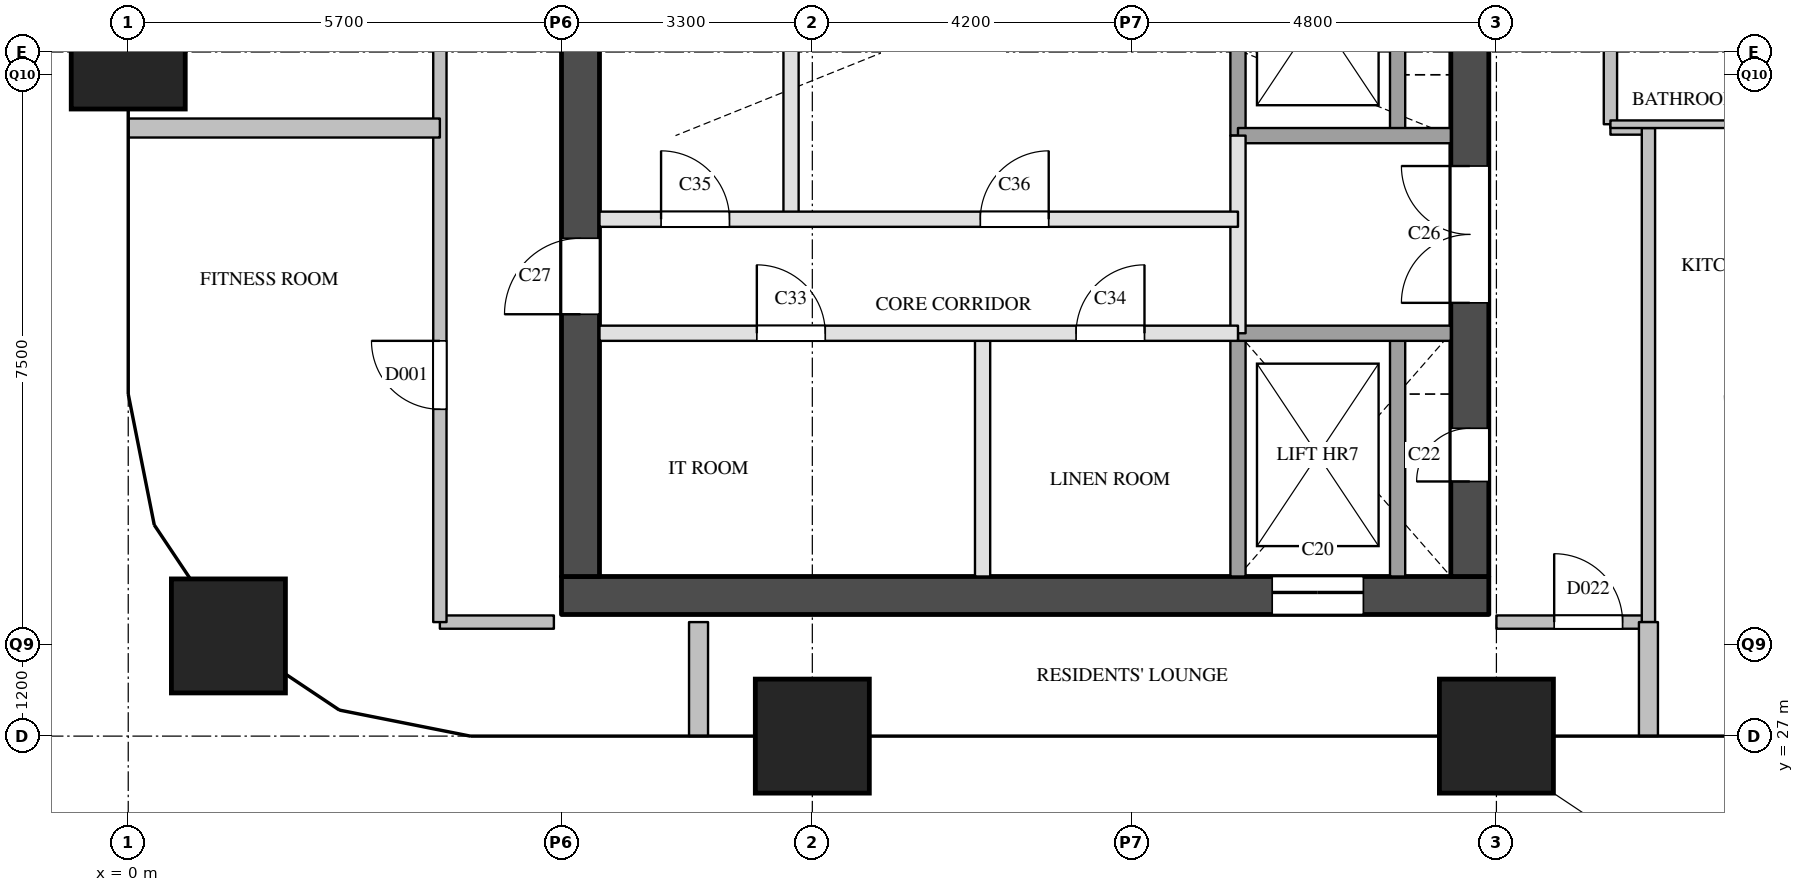
"""IFC4 building model, lengths in metres.
Left out: names, types, materials, properties, quantities, classifications, styles, units other than length and angle.
Written with IfcOpenShell. Run it as: python <this file> out.ifc"""

import sys

from ifc_helpers import new_model, si_unit, direction, frame, frame_2d, origin, origin_2d, place, context, subcontext, project, spatial, rectangle, extrude, element, fill, save


model = new_model("IFC4")
c1 = context("Model", 3, precision=1e-05, world=origin(), true_north=direction((0.0, 1.0)))
c2 = subcontext(c1, "Body", "Model", "MODEL_VIEW")
j1 = project(units=[si_unit("LENGTHUNIT", "METRE"), si_unit("PLANEANGLEUNIT", "RADIAN")], contexts=[c1])
p1 = place(None, origin())
s1 = spatial("IfcSite", under=j1, at=p1, CompositionType="ELEMENT")
p2 = place(p1, origin())
s2 = spatial("IfcBuilding", under=s1, at=p2, CompositionType="ELEMENT")
p3 = place(p2, frame((0.0, 0.0, 142.7)))
s3 = spatial("IfcBuildingStorey", under=s2, at=p3, CompositionType="ELEMENT", Elevation=142.7)
for number, where, z_axis, x_axis in (
    (1, (1.318, 28.318, 0.0), (0.0, 0.0, 1.0), (1.0, 0.0, 0.0)),
    (2, (0.0, 36.0, 0.0), (0.0, 0.0, 1.0), (1.0, 0.0, 0.0)),
    (3, (9.0, 27.0, 0.0), (0.0, 0.0, 1.0), (1.0, 0.0, 0.0)),
    (4, (18.0, 27.0, 0.0), (0.0, 0.0, 1.0), (1.0, 0.0, 0.0)),
):
    element("IfcColumn", number, at=place(p3, frame(where, z_axis=z_axis, x_axis=x_axis)), inside=s3, PredefinedType="COLUMN", context=c2, shape_type="SweptSolid", body=[
        extrude(rectangle(XDim=1.5, YDim=1.5, at=origin_2d()), origin(), (0.0, 0.0, 1.0), 3.9),
    ])
p4 = place(p3, frame((5.7, 28.85, 0.0), z_axis=(0.0, 0.0, 1.0), x_axis=(1.0, 0.0, 0.0)))
e5 = element("IfcWall", 5, at=p4, inside=s3, PredefinedType="SHEAR", context=c2, shape_type="SweptSolid", body=[
    extrude(rectangle(XDim=12.2, YDim=0.5, at=frame_2d((6.1, 0.0))), origin(), (0.0, 0.0, 1.0), 3.6),
])
p5 = place(p4, frame((9.35, 0.0, 0.0)))
e6 = element("IfcOpeningElement", 6, at=p5, cuts=e5, PredefinedType="OPENING", context=c2, shape_type="SweptSolid", body=[
    extrude(rectangle(XDim=1.2, YDim=2.1, at=frame_2d((0.6, 1.05))), frame((0.0, 0.26, 0.0), z_axis=(0.0, -1.0, 0.0), x_axis=(1.0, 0.0, 0.0)), (0.0, 0.0, 1.0), 0.52),
])
p6 = place(p3, frame((5.95, 29.1, 0.0), z_axis=(0.0, 0.0, 1.0), x_axis=(0.0, 1.0, 0.0)))
e7 = element("IfcWall", 7, at=p6, inside=s3, PredefinedType="SHEAR", context=c2, shape_type="SweptSolid", body=[
    extrude(rectangle(XDim=20.3, YDim=0.5, at=frame_2d((10.15, 0.0))), origin(), (0.0, 0.0, 1.0), 3.6),
])
p7 = place(p6, frame((3.45, 0.0, 0.0)))
e8 = element("IfcOpeningElement", 8, at=p7, cuts=e7, PredefinedType="OPENING", context=c2, shape_type="SweptSolid", body=[
    extrude(rectangle(XDim=1.0, YDim=2.1, at=frame_2d((0.5, 1.05))), frame((0.0, 0.26, 0.0), z_axis=(0.0, -1.0, 0.0), x_axis=(1.0, 0.0, 0.0)), (0.0, 0.0, 1.0), 0.52),
])
p8 = place(p6, frame((16.4, 0.0, 0.0)))
e9 = element("IfcOpeningElement", 9, at=p8, cuts=e7, PredefinedType="OPENING", context=c2, shape_type="SweptSolid", body=[
    extrude(rectangle(XDim=1.0, YDim=2.1, at=frame_2d((0.5, 1.05))), frame((0.0, 0.26, 0.0), z_axis=(0.0, -1.0, 0.0), x_axis=(1.0, 0.0, 0.0)), (0.0, 0.0, 1.0), 0.52),
])
p9 = place(p3, frame((17.65, 29.1, 0.0), z_axis=(0.0, 0.0, 1.0), x_axis=(0.0, 1.0, 0.0)))
e10 = element("IfcWall", 10, at=p9, inside=s3, PredefinedType="SHEAR", context=c2, shape_type="SweptSolid", body=[
    extrude(rectangle(XDim=20.3, YDim=0.5, at=frame_2d((10.15, 0.0))), origin(), (0.0, 0.0, 1.0), 3.6),
])
p10 = place(p9, frame((1.25, 0.0, 0.0)))
e11 = element("IfcOpeningElement", 11, at=p10, cuts=e10, PredefinedType="OPENING", context=c2, shape_type="SweptSolid", body=[
    extrude(rectangle(XDim=0.7, YDim=2.1, at=frame_2d((0.35, 1.05))), frame((0.0, 0.26, 0.0), z_axis=(0.0, -1.0, 0.0), x_axis=(1.0, 0.0, 0.0)), (0.0, 0.0, 1.0), 0.52),
])
p11 = place(p9, frame((7.05, 0.0, 0.0)))
e12 = element("IfcOpeningElement", 12, at=p11, cuts=e10, PredefinedType="OPENING", context=c2, shape_type="SweptSolid", body=[
    extrude(rectangle(XDim=0.7, YDim=2.1, at=frame_2d((0.35, 1.05))), frame((0.0, 0.26, 0.0), z_axis=(0.0, -1.0, 0.0), x_axis=(1.0, 0.0, 0.0)), (0.0, 0.0, 1.0), 0.52),
])
p12 = place(p9, frame((3.6, 0.0, 0.0)))
e13 = element("IfcOpeningElement", 13, at=p12, cuts=e10, PredefinedType="OPENING", context=c2, shape_type="SweptSolid", body=[
    extrude(rectangle(XDim=1.8, YDim=2.1, at=frame_2d((0.9, 1.05))), frame((0.0, 0.26, 0.0), z_axis=(0.0, -1.0, 0.0), x_axis=(1.0, 0.0, 0.0)), (0.0, 0.0, 1.0), 0.52),
])
p13 = place(p3, frame((8.72, 33.8, 0.0), z_axis=(0.0, 0.0, 1.0), x_axis=(0.0, 1.0, 0.0)))
e14 = element("IfcWall", 14, at=p13, inside=s3, PredefinedType="PARTITIONING", context=c2, shape_type="SweptSolid", body=[
    extrude(rectangle(XDim=4.3, YDim=0.2, at=frame_2d((2.15, 0.0))), origin(), (0.0, 0.0, 1.0), 3.6),
])
p14 = place(p3, frame((11.24, 29.1, 0.0), z_axis=(0.0, 0.0, 1.0), x_axis=(0.0, 1.0, 0.0)))
e15 = element("IfcWall", 15, at=p14, inside=s3, PredefinedType="PARTITIONING", context=c2, shape_type="SweptSolid", body=[
    extrude(rectangle(XDim=3.2, YDim=0.2, at=frame_2d((1.6, 0.0))), origin(), (0.0, 0.0, 1.0), 3.6),
])
p15 = place(p3, frame((14.6, 32.3, 0.0), z_axis=(0.0, 0.0, 1.0), x_axis=(0.0, 1.0, 0.0)))
e16 = element("IfcWall", 16, at=p15, inside=s3, PredefinedType="PARTITIONING", context=c2, shape_type="SweptSolid", body=[
    extrude(rectangle(XDim=2.6, YDim=0.2, at=frame_2d((1.3, 0.0))), origin(), (0.0, 0.0, 1.0), 3.6),
])
p16 = place(p3, frame((14.6, 29.1, 0.0), z_axis=(0.0, 0.0, 1.0), x_axis=(0.0, 1.0, 0.0)))
e17 = element("IfcWall", 17, at=p16, inside=s3, PredefinedType="SOLIDWALL", context=c2, shape_type="SweptSolid", body=[
    extrude(rectangle(XDim=3.2, YDim=0.2, at=frame_2d((1.6, 0.0))), origin(), (0.0, 0.0, 1.0), 3.6),
])
p17 = place(p3, frame((14.6, 34.9, 0.0), z_axis=(0.0, 0.0, 1.0), x_axis=(0.0, 1.0, 0.0)))
e18 = element("IfcWall", 18, at=p17, inside=s3, PredefinedType="SOLIDWALL", context=c2, shape_type="SweptSolid", body=[
    extrude(rectangle(XDim=3.2, YDim=0.2, at=frame_2d((1.6, 0.0))), origin(), (0.0, 0.0, 1.0), 3.6),
])
p18 = place(p3, frame((16.7, 29.1, 0.0), z_axis=(0.0, 0.0, 1.0), x_axis=(0.0, 1.0, 0.0)))
e19 = element("IfcWall", 19, at=p18, inside=s3, PredefinedType="SOLIDWALL", context=c2, shape_type="SweptSolid", body=[
    extrude(rectangle(XDim=3.2, YDim=0.2, at=frame_2d((1.6, 0.0))), origin(), (0.0, 0.0, 1.0), 3.6),
])
p19 = place(p3, frame((16.7, 34.9, 0.0), z_axis=(0.0, 0.0, 1.0), x_axis=(0.0, 1.0, 0.0)))
e20 = element("IfcWall", 20, at=p19, inside=s3, PredefinedType="SOLIDWALL", context=c2, shape_type="SweptSolid", body=[
    extrude(rectangle(XDim=3.2, YDim=0.2, at=frame_2d((1.6, 0.0))), origin(), (0.0, 0.0, 1.0), 3.6),
])
p20 = place(p3, frame((6.2, 32.3, 0.0), z_axis=(0.0, 0.0, 1.0), x_axis=(1.0, 0.0, 0.0)))
e21 = element("IfcWall", 21, at=p20, inside=s3, PredefinedType="PARTITIONING", context=c2, shape_type="SweptSolid", body=[
    extrude(rectangle(XDim=8.4, YDim=0.2, at=frame_2d((4.2, 0.0))), origin(), (0.0, 0.0, 1.0), 3.6),
])
p21 = place(p20, frame((2.07, 0.0, 0.0)))
e22 = element("IfcOpeningElement", 22, at=p21, cuts=e21, PredefinedType="OPENING", context=c2, shape_type="SweptSolid", body=[
    extrude(rectangle(XDim=0.9, YDim=2.1, at=frame_2d((0.45, 1.05))), frame((0.0, 0.11, 0.0), z_axis=(0.0, -1.0, 0.0), x_axis=(1.0, 0.0, 0.0)), (0.0, 0.0, 1.0), 0.22),
])
p22 = place(p20, frame((6.27, 0.0, 0.0)))
e23 = element("IfcOpeningElement", 23, at=p22, cuts=e21, PredefinedType="OPENING", context=c2, shape_type="SweptSolid", body=[
    extrude(rectangle(XDim=0.9, YDim=2.1, at=frame_2d((0.45, 1.05))), frame((0.0, 0.11, 0.0), z_axis=(0.0, -1.0, 0.0), x_axis=(1.0, 0.0, 0.0)), (0.0, 0.0, 1.0), 0.22),
])
p23 = place(p3, frame((14.6, 32.3, 0.0), z_axis=(0.0, 0.0, 1.0), x_axis=(1.0, 0.0, 0.0)))
e24 = element("IfcWall", 24, at=p23, inside=s3, PredefinedType="SOLIDWALL", context=c2, shape_type="SweptSolid", body=[
    extrude(rectangle(XDim=2.8, YDim=0.2, at=frame_2d((1.4, 0.0))), origin(), (0.0, 0.0, 1.0), 3.6),
])
p24 = place(p3, frame((6.2, 33.8, 0.0), z_axis=(0.0, 0.0, 1.0), x_axis=(1.0, 0.0, 0.0)))
e25 = element("IfcWall", 25, at=p24, inside=s3, PredefinedType="PARTITIONING", context=c2, shape_type="SweptSolid", body=[
    extrude(rectangle(XDim=8.4, YDim=0.2, at=frame_2d((4.2, 0.0))), origin(), (0.0, 0.0, 1.0), 3.6),
])
p25 = place(p24, frame((0.81, 0.0, 0.0)))
e26 = element("IfcOpeningElement", 26, at=p25, cuts=e25, PredefinedType="OPENING", context=c2, shape_type="SweptSolid", body=[
    extrude(rectangle(XDim=0.9, YDim=2.1, at=frame_2d((0.45, 1.05))), frame((0.0, 0.11, 0.0), z_axis=(0.0, -1.0, 0.0), x_axis=(1.0, 0.0, 0.0)), (0.0, 0.0, 1.0), 0.22),
])
p26 = place(p24, frame((5.01, 0.0, 0.0)))
e27 = element("IfcOpeningElement", 27, at=p26, cuts=e25, PredefinedType="OPENING", context=c2, shape_type="SweptSolid", body=[
    extrude(rectangle(XDim=0.9, YDim=2.1, at=frame_2d((0.45, 1.05))), frame((0.0, 0.11, 0.0), z_axis=(0.0, -1.0, 0.0), x_axis=(1.0, 0.0, 0.0)), (0.0, 0.0, 1.0), 0.22),
])
p27 = place(p3, frame((14.6, 34.9, 0.0), z_axis=(0.0, 0.0, 1.0), x_axis=(1.0, 0.0, 0.0)))
e28 = element("IfcWall", 28, at=p27, inside=s3, PredefinedType="SOLIDWALL", context=c2, shape_type="SweptSolid", body=[
    extrude(rectangle(XDim=2.8, YDim=0.2, at=frame_2d((1.4, 0.0))), origin(), (0.0, 0.0, 1.0), 3.6),
])
p28 = place(p3, frame((4.1, 28.5, 0.0), z_axis=(0.0, 0.0, 1.0), x_axis=(1.0, 0.0, 0.0)))
e29 = element("IfcWall", 29, at=p28, inside=s3, PredefinedType="PARTITIONING", context=c2, shape_type="SweptSolid", body=[
    extrude(rectangle(XDim=1.5, YDim=0.175, at=frame_2d((0.75, 0.0))), origin(), (0.0, 0.0, 1.0), 3.6),
])
p29 = place(p3, frame((18.0, 28.5, 0.0), z_axis=(0.0, 0.0, 1.0), x_axis=(1.0, 0.0, 0.0)))
e30 = element("IfcWall", 30, at=p29, inside=s3, PredefinedType="PARTITIONING", context=c2, shape_type="SweptSolid", body=[
    extrude(rectangle(XDim=2.0, YDim=0.175, at=frame_2d((1.0, 0.0))), origin(), (0.0, 0.0, 1.0), 3.6),
])
p30 = place(p29, frame((0.76, 0.0, 0.0)))
e31 = element("IfcOpeningElement", 31, at=p30, cuts=e30, PredefinedType="OPENING", context=c2, shape_type="SweptSolid", body=[
    extrude(rectangle(XDim=0.9, YDim=2.1, at=frame_2d((0.45, 1.05))), frame((0.0, 0.097, 0.0), z_axis=(0.0, -1.0, 0.0), x_axis=(1.0, 0.0, 0.0)), (0.0, 0.0, 1.0), 0.195),
])
p31 = place(p3, frame((19.5, 35.0, 0.0), z_axis=(0.0, 0.0, 1.0), x_axis=(1.0, 0.0, 0.0)))
e32 = element("IfcWall", 32, at=p31, inside=s3, PredefinedType="PARTITIONING", context=c2, shape_type="SweptSolid", body=[
    extrude(rectangle(XDim=0.5, YDim=0.175, at=frame_2d((0.25, 0.0))), origin(), (0.0, 0.0, 1.0), 3.6),
])
p32 = place(p3, frame((4.1, 28.5, 0.0), z_axis=(0.0, 0.0, 1.0), x_axis=(0.0, 1.0, 0.0)))
e33 = element("IfcWall", 33, at=p32, inside=s3, PredefinedType="PARTITIONING", context=c2, shape_type="SweptSolid", body=[
    extrude(rectangle(XDim=23.0, YDim=0.175, at=frame_2d((11.5, 0.0))), origin(), (0.0, 0.0, 1.0), 3.6),
])
p33 = place(p32, frame((2.8, 0.0, 0.0)))
e34 = element("IfcOpeningElement", 34, at=p33, cuts=e33, PredefinedType="OPENING", context=c2, shape_type="SweptSolid", body=[
    extrude(rectangle(XDim=0.9, YDim=2.1, at=frame_2d((0.45, 1.05))), frame((0.0, 0.097, 0.0), z_axis=(0.0, -1.0, 0.0), x_axis=(1.0, 0.0, 0.0)), (0.0, 0.0, 1.0), 0.195),
])
p34 = place(p32, frame((14.3, 0.0, 0.0)))
e35 = element("IfcOpeningElement", 35, at=p34, cuts=e33, PredefinedType="OPENING", context=c2, shape_type="SweptSolid", body=[
    extrude(rectangle(XDim=0.9, YDim=2.1, at=frame_2d((0.45, 1.05))), frame((0.0, 0.097, 0.0), z_axis=(0.0, -1.0, 0.0), x_axis=(1.0, 0.0, 0.0)), (0.0, 0.0, 1.0), 0.195),
])
p35 = place(p3, frame((19.5, 35.05, 0.0), z_axis=(0.0, 0.0, 1.0), x_axis=(0.0, 1.0, 0.0)))
e36 = element("IfcWall", 36, at=p35, inside=s3, PredefinedType="PARTITIONING", context=c2, shape_type="SweptSolid", body=[
    extrude(rectangle(XDim=4.2, YDim=0.175, at=frame_2d((2.1, 0.0))), origin(), (0.0, 0.0, 1.0), 3.6),
])
p36 = place(p3, frame((20.0, 28.5, 0.0), z_axis=(0.0, 0.0, 1.0), x_axis=(0.0, 1.0, 0.0)))
e37 = element("IfcWall", 37, at=p36, inside=s3, PredefinedType="PARTITIONING", context=c2, shape_type="SweptSolid", body=[
    extrude(rectangle(XDim=6.5, YDim=0.175, at=frame_2d((3.25, 0.0))), origin(), (0.0, 0.0, 1.0), 3.6),
])
p37 = place(p3, frame((0.0, 35.0, 0.0), z_axis=(0.0, 0.0, 1.0), x_axis=(1.0, 0.0, 0.0)))
e38 = element("IfcWall", 38, at=p37, inside=s3, PredefinedType="PARTITIONING", context=c2, shape_type="SweptSolid", body=[
    extrude(rectangle(XDim=4.1, YDim=0.25, at=frame_2d((2.05, 0.0))), origin(), (0.0, 0.0, 1.0), 2.6),
])
for number, where, z_axis, x_axis in (
    (39, (7.503, 27.0, 0.0), (0.0, 0.0, 1.0), (0.0, 1.0, 0.0)),
    (40, (20.0, 27.0, 0.0), (0.0, 0.0, 1.0), (0.0, 1.0, 0.0)),
):
    element("IfcWall", number, at=place(p3, frame(where, z_axis=z_axis, x_axis=x_axis)), inside=s3, PredefinedType="PARTITIONING", context=c2, shape_type="SweptSolid", body=[
        extrude(rectangle(XDim=1.5, YDim=0.25, at=frame_2d((0.75, 0.0))), origin(), (0.0, 0.0, 1.0), 2.6),
    ])
p38 = place(p3, frame((19.5, 35.05, 0.0), z_axis=(0.0, 0.0, 1.0), x_axis=(1.0, 0.0, 0.0)))
e41 = element("IfcWall", 41, at=p38, inside=s3, PredefinedType="PARTITIONING", context=c2, shape_type="SweptSolid", body=[
    extrude(rectangle(XDim=2.4, YDim=0.1, at=frame_2d((1.2, 0.0))), origin(), (0.0, 0.0, 1.0), 3.6),
])
p39 = place(p5, origin())
e42 = element("IfcDoor", 42, at=p39, inside=s3, OperationType="SLIDING_TO_LEFT", PredefinedType="DOOR", context=c2, shape_type="SweptSolid", body=[
    extrude(rectangle(XDim=1.2, YDim=2.1, at=frame_2d((0.6, 1.05))), frame((0.0, 0.025, 0.0), z_axis=(0.0, -1.0, 0.0), x_axis=(1.0, 0.0, 0.0)), (0.0, 0.0, 1.0), 0.05),
])
fill(e6, e42)
p40 = place(p10, origin())
e43 = element("IfcDoor", 43, at=p40, inside=s3, OperationType="SINGLE_SWING_LEFT", PredefinedType="DOOR", context=c2, shape_type="SweptSolid", body=[
    extrude(rectangle(XDim=0.7, YDim=2.1, at=frame_2d((0.35, 1.05))), frame((0.0, 0.025, 0.0), z_axis=(0.0, -1.0, 0.0), x_axis=(1.0, 0.0, 0.0)), (0.0, 0.0, 1.0), 0.05),
])
fill(e11, e43)
p41 = place(p12, origin())
e44 = element("IfcDoor", 44, at=p41, inside=s3, OperationType="DOUBLE_DOOR_SINGLE_SWING", PredefinedType="DOOR", context=c2, shape_type="SweptSolid", body=[
    extrude(rectangle(XDim=1.8, YDim=2.1, at=frame_2d((0.9, 1.05))), frame((0.0, 0.025, 0.0), z_axis=(0.0, -1.0, 0.0), x_axis=(1.0, 0.0, 0.0)), (0.0, 0.0, 1.0), 0.05),
])
fill(e13, e44)
p42 = place(p7, origin())
e45 = element("IfcDoor", 45, at=p42, inside=s3, OperationType="SINGLE_SWING_LEFT", PredefinedType="DOOR", context=c2, shape_type="SweptSolid", body=[
    extrude(rectangle(XDim=1.0, YDim=2.1, at=frame_2d((0.5, 1.05))), frame((0.0, 0.025, 0.0), z_axis=(0.0, -1.0, 0.0), x_axis=(1.0, 0.0, 0.0)), (0.0, 0.0, 1.0), 0.05),
])
fill(e8, e45)
p43 = place(p21, origin())
e46 = element("IfcDoor", 46, at=p43, inside=s3, OperationType="SINGLE_SWING_LEFT", PredefinedType="DOOR", context=c2, shape_type="SweptSolid", body=[
    extrude(rectangle(XDim=0.9, YDim=2.1, at=frame_2d((0.45, 1.05))), frame((0.0, 0.025, 0.0), z_axis=(0.0, -1.0, 0.0), x_axis=(1.0, 0.0, 0.0)), (0.0, 0.0, 1.0), 0.05),
])
fill(e22, e46)
p44 = place(p22, origin())
e47 = element("IfcDoor", 47, at=p44, inside=s3, OperationType="SINGLE_SWING_RIGHT", PredefinedType="DOOR", context=c2, shape_type="SweptSolid", body=[
    extrude(rectangle(XDim=0.9, YDim=2.1, at=frame_2d((0.45, 1.05))), frame((0.0, 0.025, 0.0), z_axis=(0.0, -1.0, 0.0), x_axis=(1.0, 0.0, 0.0)), (0.0, 0.0, 1.0), 0.05),
])
fill(e23, e47)
p45 = place(p25, origin())
e48 = element("IfcDoor", 48, at=p45, inside=s3, OperationType="SINGLE_SWING_LEFT", PredefinedType="DOOR", context=c2, shape_type="SweptSolid", body=[
    extrude(rectangle(XDim=0.9, YDim=2.1, at=frame_2d((0.45, 1.05))), frame((0.0, 0.025, 0.0), z_axis=(0.0, -1.0, 0.0), x_axis=(1.0, 0.0, 0.0)), (0.0, 0.0, 1.0), 0.05),
])
fill(e26, e48)
p46 = place(p26, origin())
e49 = element("IfcDoor", 49, at=p46, inside=s3, OperationType="SINGLE_SWING_RIGHT", PredefinedType="DOOR", context=c2, shape_type="SweptSolid", body=[
    extrude(rectangle(XDim=0.9, YDim=2.1, at=frame_2d((0.45, 1.05))), frame((0.0, 0.025, 0.0), z_axis=(0.0, -1.0, 0.0), x_axis=(1.0, 0.0, 0.0)), (0.0, 0.0, 1.0), 0.05),
])
fill(e27, e49)
p47 = place(p33, origin())
e50 = element("IfcDoor", 50, at=p47, inside=s3, OperationType="SINGLE_SWING_RIGHT", PredefinedType="DOOR", context=c2, shape_type="SweptSolid", body=[
    extrude(rectangle(XDim=0.9, YDim=2.1, at=frame_2d((0.45, 1.05))), frame((0.0, 0.025, 0.0), z_axis=(0.0, -1.0, 0.0), x_axis=(1.0, 0.0, 0.0)), (0.0, 0.0, 1.0), 0.05),
])
fill(e34, e50)
p48 = place(p30, origin())
e51 = element("IfcDoor", 51, at=p48, inside=s3, OperationType="SINGLE_SWING_LEFT", PredefinedType="DOOR", context=c2, shape_type="SweptSolid", body=[
    extrude(rectangle(XDim=0.9, YDim=2.1, at=frame_2d((0.45, 1.05))), frame((0.0, 0.025, 0.0), z_axis=(0.0, -1.0, 0.0), x_axis=(1.0, 0.0, 0.0)), (0.0, 0.0, 1.0), 0.05),
])
fill(e31, e51)
save(model, sys.argv[1])
